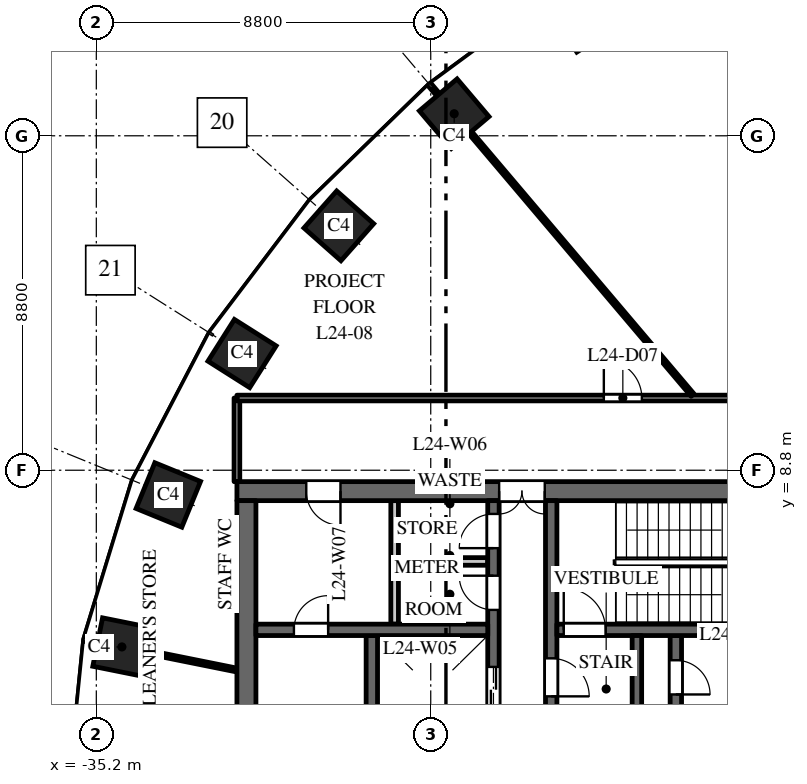
"""IFC4 building model, lengths in metres.
Left out: names, types, materials, properties, quantities, classifications, styles, units other than length and angle.
Written with IfcOpenShell. Run it as: python <this file> out.ifc"""

import sys

from ifc_helpers import new_model, si_unit, direction, frame, frame_2d, origin, origin_2d, place, context, subcontext, project, spatial, rectangle, extrude, element, fill, save


model = new_model("IFC4")
c1 = context("Model", 3, precision=1e-05, world=origin(), true_north=direction((0.0, 1.0)))
c2 = subcontext(c1, "Body", "Model", "MODEL_VIEW")
j1 = project(units=[si_unit("LENGTHUNIT", "METRE"), si_unit("PLANEANGLEUNIT", "RADIAN")], contexts=[c1])
p1 = place(None, origin())
s1 = spatial("IfcSite", under=j1, at=p1, CompositionType="ELEMENT")
p2 = place(p1, origin())
s2 = spatial("IfcBuilding", under=s1, at=p2, CompositionType="ELEMENT")
p3 = place(p2, frame((0.0, 0.0, 108.0)))
s3 = spatial("IfcBuildingStorey", under=s2, at=p3, CompositionType="ELEMENT", Elevation=108.0)
for number, where, z_axis, x_axis in (
    (1, (-25.783, 18.18, 0.0), (0.0, 0.0, 1.0), (-0.763, -0.646, 0.0)),
    (2, (-28.819, 15.23, 0.0), (0.0, 0.0, 1.0), (-0.663, -0.749, 0.0)),
    (3, (-31.365, 11.871, 0.0), (0.0, 0.0, 1.0), (-0.535, -0.845, 0.0)),
    (4, (-33.305, 8.149, 0.0), (0.0, 0.0, 1.0), (-0.379, -0.925, 0.0)),
    (5, (-34.527, 4.151, 0.0), (0.0, 0.0, 1.0), (-0.197, -0.98, 0.0)),
):
    element("IfcColumn", number, at=place(p3, frame(where, z_axis=z_axis, x_axis=x_axis)), inside=s3, PredefinedType="COLUMN", context=c2, shape_type="SweptSolid", body=[
        extrude(rectangle(XDim=1.3, YDim=1.3, at=origin_2d()), origin(), (0.0, 0.0, 1.0), 4.0),
    ])
p4 = place(p3, frame((-16.5, 8.25, 0.0), z_axis=(0.0, 0.0, 1.0), x_axis=(-1.0, 0.0, 0.0)))
e6 = element("IfcWall", 6, at=p4, inside=s3, PredefinedType="SHEAR", context=c2, shape_type="SweptSolid", body=[
    extrude(rectangle(XDim=15.0, YDim=0.5, at=frame_2d((7.5, 0.0))), origin(), (0.0, 0.0, 1.0), 3.7),
])
p5 = place(p4, frame((6.9, 0.0, 0.0)))
e7 = element("IfcOpeningElement", 7, at=p5, cuts=e6, PredefinedType="OPENING", context=c2, shape_type="SweptSolid", body=[
    extrude(rectangle(XDim=1.2, YDim=2.1, at=frame_2d((0.6, 1.05))), frame((0.0, 0.26, 0.0), z_axis=(0.0, -1.0, 0.0), x_axis=(1.0, 0.0, 0.0)), (0.0, 0.0, 1.0), 0.52),
])
p6 = place(p4, frame((12.275, 0.0, 0.0)))
e8 = element("IfcOpeningElement", 8, at=p6, cuts=e6, PredefinedType="OPENING", context=c2, shape_type="SweptSolid", body=[
    extrude(rectangle(XDim=0.9, YDim=2.1, at=frame_2d((0.45, 1.05))), frame((0.0, 0.26, 0.0), z_axis=(0.0, -1.0, 0.0), x_axis=(1.0, 0.0, 0.0)), (0.0, 0.0, 1.0), 0.52),
])
p7 = place(p3, frame((-27.95, -4.45, 0.0), z_axis=(0.0, 0.0, 1.0), x_axis=(0.0, 1.0, 0.0)))
e9 = element("IfcWall", 9, at=p7, inside=s3, PredefinedType="SHEAR", context=c2, shape_type="SweptSolid", body=[
    extrude(rectangle(XDim=8.9, YDim=0.3, at=frame_2d((4.45, 0.0))), origin(), (0.0, 0.0, 1.0), 3.7),
])
p8 = place(p3, frame((-19.95, -4.45, 0.0), z_axis=(0.0, 0.0, 1.0), x_axis=(0.0, 1.0, 0.0)))
e10 = element("IfcWall", 10, at=p8, inside=s3, PredefinedType="SHEAR", context=c2, shape_type="SweptSolid", body=[
    extrude(rectangle(XDim=8.9, YDim=0.3, at=frame_2d((4.45, 0.0))), origin(), (0.0, 0.0, 1.0), 3.7),
])
p9 = place(p8, frame((0.775, 0.0, 0.0)))
e11 = element("IfcOpeningElement", 11, at=p9, cuts=e10, PredefinedType="OPENING", context=c2, shape_type="SweptSolid", body=[
    extrude(rectangle(XDim=1.2, YDim=2.1, at=frame_2d((0.6, 1.05))), frame((0.0, 0.16, 0.0), z_axis=(0.0, -1.0, 0.0), x_axis=(1.0, 0.0, 0.0)), (0.0, 0.0, 1.0), 0.32),
])
p10 = place(p8, frame((7.35, 0.0, 0.0)))
e12 = element("IfcOpeningElement", 12, at=p10, cuts=e10, PredefinedType="OPENING", context=c2, shape_type="SweptSolid", body=[
    extrude(rectangle(XDim=0.9, YDim=2.1, at=frame_2d((0.45, 1.05))), frame((0.0, 0.16, 0.0), z_axis=(0.0, -1.0, 0.0), x_axis=(1.0, 0.0, 0.0)), (0.0, 0.0, 1.0), 0.32),
])
p11 = place(p3, frame((-24.75, -8.0, 0.0), z_axis=(0.0, 0.0, 1.0), x_axis=(0.0, 1.0, 0.0)))
e13 = element("IfcWall", 13, at=p11, inside=s3, PredefinedType="SHEAR", context=c2, shape_type="SweptSolid", body=[
    extrude(rectangle(XDim=16.0, YDim=0.3, at=frame_2d((8.0, 0.0))), origin(), (0.0, 0.0, 1.0), 3.7),
])
p12 = place(p11, frame((4.425, 0.0, 0.0)))
e14 = element("IfcOpeningElement", 14, at=p12, cuts=e13, PredefinedType="OPENING", context=c2, shape_type="SweptSolid", body=[
    extrude(rectangle(XDim=1.1, YDim=2.1, at=frame_2d((0.55, 1.05))), frame((0.0, 0.16, 0.0), z_axis=(0.0, -1.0, 0.0), x_axis=(1.0, 0.0, 0.0)), (0.0, 0.0, 1.0), 0.32),
])
p13 = place(p11, frame((7.45, 0.0, 0.0)))
e15 = element("IfcOpeningElement", 15, at=p13, cuts=e13, PredefinedType="OPENING", context=c2, shape_type="SweptSolid", body=[
    extrude(rectangle(XDim=1.1, YDim=2.1, at=frame_2d((0.55, 1.05))), frame((0.0, 0.16, 0.0), z_axis=(0.0, -1.0, 0.0), x_axis=(1.0, 0.0, 0.0)), (0.0, 0.0, 1.0), 0.32),
])
p14 = place(p11, frame((10.425, 0.0, 0.0)))
e16 = element("IfcOpeningElement", 16, at=p14, cuts=e13, PredefinedType="OPENING", context=c2, shape_type="SweptSolid", body=[
    extrude(rectangle(XDim=1.2, YDim=2.1, at=frame_2d((0.6, 1.05))), frame((0.0, 0.16, 0.0), z_axis=(0.0, -1.0, 0.0), x_axis=(1.0, 0.0, 0.0)), (0.0, 0.0, 1.0), 0.32),
])
p15 = place(p11, frame((13.125, 0.0, 0.0)))
e17 = element("IfcOpeningElement", 17, at=p15, cuts=e13, PredefinedType="OPENING", context=c2, shape_type="SweptSolid", body=[
    extrude(rectangle(XDim=0.9, YDim=2.1, at=frame_2d((0.45, 1.05))), frame((0.0, 0.16, 0.0), z_axis=(0.0, -1.0, 0.0), x_axis=(1.0, 0.0, 0.0)), (0.0, 0.0, 1.0), 0.32),
])
p16 = place(p11, frame((14.75, 0.0, 0.0)))
e18 = element("IfcOpeningElement", 18, at=p16, cuts=e13, PredefinedType="OPENING", context=c2, shape_type="SweptSolid", body=[
    extrude(rectangle(XDim=0.9, YDim=2.1, at=frame_2d((0.45, 1.05))), frame((0.0, 0.16, 0.0), z_axis=(0.0, -1.0, 0.0), x_axis=(1.0, 0.0, 0.0)), (0.0, 0.0, 1.0), 0.32),
])
p17 = place(p11, frame((1.35, 0.0, 0.0)))
e19 = element("IfcOpeningElement", 19, at=p17, cuts=e13, PredefinedType="OPENING", context=c2, shape_type="SweptSolid", body=[
    extrude(rectangle(XDim=0.9, YDim=2.1, at=frame_2d((0.45, 1.05))), frame((0.0, 0.16, 0.0), z_axis=(0.0, -1.0, 0.0), x_axis=(1.0, 0.0, 0.0)), (0.0, 0.0, 1.0), 0.32),
])
p18 = place(p3, frame((-31.25, -8.0, 0.0), z_axis=(0.0, 0.0, 1.0), x_axis=(0.0, 1.0, 0.0)))
e20 = element("IfcWall", 20, at=p18, inside=s3, PredefinedType="SHEAR", context=c2, shape_type="SweptSolid", body=[
    extrude(rectangle(XDim=16.0, YDim=0.5, at=frame_2d((8.0, 0.0))), origin(), (0.0, 0.0, 1.0), 3.7),
])
p19 = place(p3, frame((-24.9, 4.6, 0.0), z_axis=(0.0, 0.0, 1.0), x_axis=(-1.0, 0.0, 0.0)))
e21 = element("IfcWall", 21, at=p19, inside=s3, PredefinedType="SHEAR", context=c2, shape_type="SweptSolid", body=[
    extrude(rectangle(XDim=6.1, YDim=0.3, at=frame_2d((3.05, 0.0))), origin(), (0.0, 0.0, 1.0), 3.7),
])
p20 = place(p19, frame((4.2, 0.0, 0.0)))
e22 = element("IfcOpeningElement", 22, at=p20, cuts=e21, PredefinedType="OPENING", context=c2, shape_type="SweptSolid", body=[
    extrude(rectangle(XDim=0.9, YDim=2.1, at=frame_2d((0.45, 1.05))), frame((0.0, 0.16, 0.0), z_axis=(0.0, -1.0, 0.0), x_axis=(1.0, 0.0, 0.0)), (0.0, 0.0, 1.0), 0.32),
])
p21 = place(p3, frame((-27.35, 4.75, 0.0), z_axis=(0.0, 0.0, 1.0), x_axis=(0.0, 1.0, 0.0)))
e23 = element("IfcWall", 23, at=p21, inside=s3, PredefinedType="PARTITIONING", context=c2, shape_type="SweptSolid", body=[
    extrude(rectangle(XDim=3.25, YDim=0.2, at=frame_2d((1.625, 0.0))), origin(), (0.0, 0.0, 1.0), 3.7),
])
p22 = place(p3, frame((-24.9, 6.4, 0.0), z_axis=(0.0, 0.0, 1.0), x_axis=(-1.0, 0.0, 0.0)))
e24 = element("IfcWall", 24, at=p22, inside=s3, PredefinedType="PARTITIONING", context=c2, shape_type="SweptSolid", body=[
    extrude(rectangle(XDim=2.35, YDim=0.2, at=frame_2d((1.175, 0.0))), origin(), (0.0, 0.0, 1.0), 3.7),
])
p23 = place(p3, frame((-23.23, 2.25, 0.0), z_axis=(0.0, 0.0, 1.0), x_axis=(0.0, 1.0, 0.0)))
e25 = element("IfcWall", 25, at=p23, inside=s3, PredefinedType="SHEAR", context=c2, shape_type="SweptSolid", body=[
    extrude(rectangle(XDim=5.75, YDim=0.3, at=frame_2d((2.875, 0.0))), origin(), (0.0, 0.0, 1.0), 3.7),
])
p24 = place(p23, frame((0.6, 0.0, 0.0)))
e26 = element("IfcOpeningElement", 26, at=p24, cuts=e25, PredefinedType="OPENING", context=c2, shape_type="SweptSolid", body=[
    extrude(rectangle(XDim=1.0, YDim=2.1, at=frame_2d((0.5, 1.05))), frame((0.0, 0.16, 0.0), z_axis=(0.0, -1.0, 0.0), x_axis=(1.0, 0.0, 0.0)), (0.0, 0.0, 1.0), 0.32),
])
p25 = place(p3, frame((-16.9, 4.6, 0.0), z_axis=(0.0, 0.0, 1.0), x_axis=(-1.0, 0.0, 0.0)))
e27 = element("IfcWall", 27, at=p25, inside=s3, PredefinedType="SHEAR", context=c2, shape_type="SweptSolid", body=[
    extrude(rectangle(XDim=6.18, YDim=0.3, at=frame_2d((3.09, 0.0))), origin(), (0.0, 0.0, 1.0), 3.7),
])
p26 = place(p25, frame((4.9, 0.0, 0.0)))
e28 = element("IfcOpeningElement", 28, at=p26, cuts=e27, PredefinedType="OPENING", context=c2, shape_type="SweptSolid", body=[
    extrude(rectangle(XDim=1.1, YDim=2.1, at=frame_2d((0.55, 1.05))), frame((0.0, 0.16, 0.0), z_axis=(0.0, -1.0, 0.0), x_axis=(1.0, 0.0, 0.0)), (0.0, 0.0, 1.0), 0.32),
])
p27 = place(p3, frame((-20.975, 2.25, 0.0), z_axis=(0.0, 0.0, 1.0), x_axis=(0.0, 1.0, 0.0)))
e29 = element("IfcWall", 29, at=p27, inside=s3, PredefinedType="SHEAR", context=c2, shape_type="SweptSolid", body=[
    extrude(rectangle(XDim=2.2, YDim=0.25, at=frame_2d((1.1, 0.0))), origin(), (0.0, 0.0, 1.0), 3.7),
])
p28 = place(p3, frame((-35.512, 4.349, 0.0), z_axis=(0.0, 0.0, 1.0), x_axis=(0.980357474535, -0.197228857227, 0.0)))
e30 = element("IfcWall", 30, at=p28, inside=s3, PredefinedType="PARTITIONING", context=c2, shape_type="SweptSolid", body=[
    extrude(rectangle(XDim=4.092, YDim=0.1, at=frame_2d((2.046, 0.0))), origin(), (0.0, 0.0, 1.0), 3.2),
])
p29 = place(p3, frame((-31.5, 8.5, 0.0), z_axis=(0.0, 0.0, 1.0), x_axis=(0.0, 1.0, 0.0)))
e31 = element("IfcWall", 31, at=p29, inside=s3, PredefinedType="PARTITIONING", context=c2, shape_type="SweptSolid", body=[
    extrude(rectangle(XDim=2.2, YDim=0.15, at=frame_2d((1.1, 0.0))), origin(), (0.0, 0.0, 1.0), 3.7),
])
p30 = place(p3, frame((-31.5, 10.7, 0.0), z_axis=(0.0, 0.0, 1.0), x_axis=(1.0, 0.0, 0.0)))
e32 = element("IfcWall", 32, at=p30, inside=s3, PredefinedType="PARTITIONING", context=c2, shape_type="SweptSolid", body=[
    extrude(rectangle(XDim=15.0, YDim=0.15, at=frame_2d((7.5, 0.0))), origin(), (0.0, 0.0, 1.0), 3.1),
])
p31 = place(p30, frame((9.655, 0.0, 0.0)))
e33 = element("IfcOpeningElement", 33, at=p31, cuts=e32, PredefinedType="OPENING", context=c2, shape_type="SweptSolid", body=[
    extrude(rectangle(XDim=1.0, YDim=2.1, at=frame_2d((0.5, 1.05))), frame((0.0, 0.085, 0.0), z_axis=(0.0, -1.0, 0.0), x_axis=(1.0, 0.0, 0.0)), (0.0, 0.0, 1.0), 0.17),
])
p32 = place(p3, frame((-26.43, 18.945, 0.0), z_axis=(0.0, 0.0, 1.0), x_axis=(0.646400187952, -0.762998556365, 0.0)))
e34 = element("IfcWall", 34, at=p32, inside=s3, PredefinedType="PARTITIONING", context=c2, shape_type="SweptSolid", body=[
    extrude(rectangle(XDim=10.704, YDim=0.1, at=frame_2d((5.352, 0.0))), origin(), (0.0, 0.0, 1.0), 3.7),
])
p33 = place(p14, origin())
e35 = element("IfcDoor", 35, at=p33, inside=s3, OperationType="DOUBLE_DOOR_SLIDING", PredefinedType="DOOR", context=c2, shape_type="SweptSolid", body=[
    extrude(rectangle(XDim=1.2, YDim=2.1, at=frame_2d((0.6, 1.05))), frame((0.0, 0.025, 0.0), z_axis=(0.0, -1.0, 0.0), x_axis=(1.0, 0.0, 0.0)), (0.0, 0.0, 1.0), 0.05),
])
fill(e16, e35)
p34 = place(p26, origin())
e36 = element("IfcDoor", 36, at=p34, inside=s3, OperationType="SINGLE_SWING_RIGHT", PredefinedType="DOOR", context=c2, shape_type="SweptSolid", body=[
    extrude(rectangle(XDim=1.1, YDim=2.1, at=frame_2d((0.55, 1.05))), frame((0.0, 0.025, 0.0), z_axis=(0.0, -1.0, 0.0), x_axis=(1.0, 0.0, 0.0)), (0.0, 0.0, 1.0), 0.05),
])
fill(e28, e36)
p35 = place(p24, origin())
e37 = element("IfcDoor", 37, at=p35, inside=s3, OperationType="SINGLE_SWING_LEFT", PredefinedType="DOOR", context=c2, shape_type="SweptSolid", body=[
    extrude(rectangle(XDim=1.0, YDim=2.1, at=frame_2d((0.5, 1.05))), frame((0.0, 0.025, 0.0), z_axis=(0.0, -1.0, 0.0), x_axis=(1.0, 0.0, 0.0)), (0.0, 0.0, 1.0), 0.05),
])
fill(e26, e37)
p36 = place(p5, origin())
e38 = element("IfcDoor", 38, at=p36, inside=s3, OperationType="DOUBLE_DOOR_DOUBLE_SWING", PredefinedType="DOOR", context=c2, shape_type="SweptSolid", body=[
    extrude(rectangle(XDim=1.2, YDim=2.1, at=frame_2d((0.6, 1.05))), frame((0.0, 0.025, 0.0), z_axis=(0.0, -1.0, 0.0), x_axis=(1.0, 0.0, 0.0)), (0.0, 0.0, 1.0), 0.05),
])
fill(e7, e38)
p37 = place(p10, origin())
e39 = element("IfcDoor", 39, at=p37, inside=s3, OperationType="SINGLE_SWING_LEFT", PredefinedType="DOOR", context=c2, shape_type="SweptSolid", body=[
    extrude(rectangle(XDim=0.9, YDim=2.1, at=frame_2d((0.45, 1.05))), frame((0.0, 0.025, 0.0), z_axis=(0.0, -1.0, 0.0), x_axis=(1.0, 0.0, 0.0)), (0.0, 0.0, 1.0), 0.05),
])
fill(e12, e39)
p38 = place(p15, origin())
e40 = element("IfcDoor", 40, at=p38, inside=s3, OperationType="SINGLE_SWING_LEFT", PredefinedType="DOOR", context=c2, shape_type="SweptSolid", body=[
    extrude(rectangle(XDim=0.9, YDim=2.1, at=frame_2d((0.45, 1.05))), frame((0.0, 0.025, 0.0), z_axis=(0.0, -1.0, 0.0), x_axis=(1.0, 0.0, 0.0)), (0.0, 0.0, 1.0), 0.05),
])
fill(e17, e40)
p39 = place(p16, origin())
e41 = element("IfcDoor", 41, at=p39, inside=s3, OperationType="SINGLE_SWING_RIGHT", PredefinedType="DOOR", context=c2, shape_type="SweptSolid", body=[
    extrude(rectangle(XDim=0.9, YDim=2.1, at=frame_2d((0.45, 1.05))), frame((0.0, 0.025, 0.0), z_axis=(0.0, -1.0, 0.0), x_axis=(1.0, 0.0, 0.0)), (0.0, 0.0, 1.0), 0.05),
])
fill(e18, e41)
p40 = place(p6, origin())
e42 = element("IfcDoor", 42, at=p40, inside=s3, OperationType="SINGLE_SWING_RIGHT", PredefinedType="DOOR", context=c2, shape_type="SweptSolid", body=[
    extrude(rectangle(XDim=0.9, YDim=2.1, at=frame_2d((0.45, 1.05))), frame((0.0, 0.025, 0.0), z_axis=(0.0, -1.0, 0.0), x_axis=(1.0, 0.0, 0.0)), (0.0, 0.0, 1.0), 0.05),
])
fill(e8, e42)
p41 = place(p20, origin())
e43 = element("IfcDoor", 43, at=p41, inside=s3, OperationType="SINGLE_SWING_LEFT", PredefinedType="DOOR", context=c2, shape_type="SweptSolid", body=[
    extrude(rectangle(XDim=0.9, YDim=2.1, at=frame_2d((0.45, 1.05))), frame((0.0, 0.025, 0.0), z_axis=(0.0, -1.0, 0.0), x_axis=(1.0, 0.0, 0.0)), (0.0, 0.0, 1.0), 0.05),
])
fill(e22, e43)
p42 = place(p31, origin())
e44 = element("IfcDoor", 44, at=p42, inside=s3, OperationType="SINGLE_SWING_LEFT", PredefinedType="DOOR", context=c2, shape_type="SweptSolid", body=[
    extrude(rectangle(XDim=1.0, YDim=2.1, at=frame_2d((0.5, 1.05))), frame((0.0, 0.025, 0.0), z_axis=(0.0, -1.0, 0.0), x_axis=(1.0, 0.0, 0.0)), (0.0, 0.0, 1.0), 0.05),
])
fill(e33, e44)
save(model, sys.argv[1])
